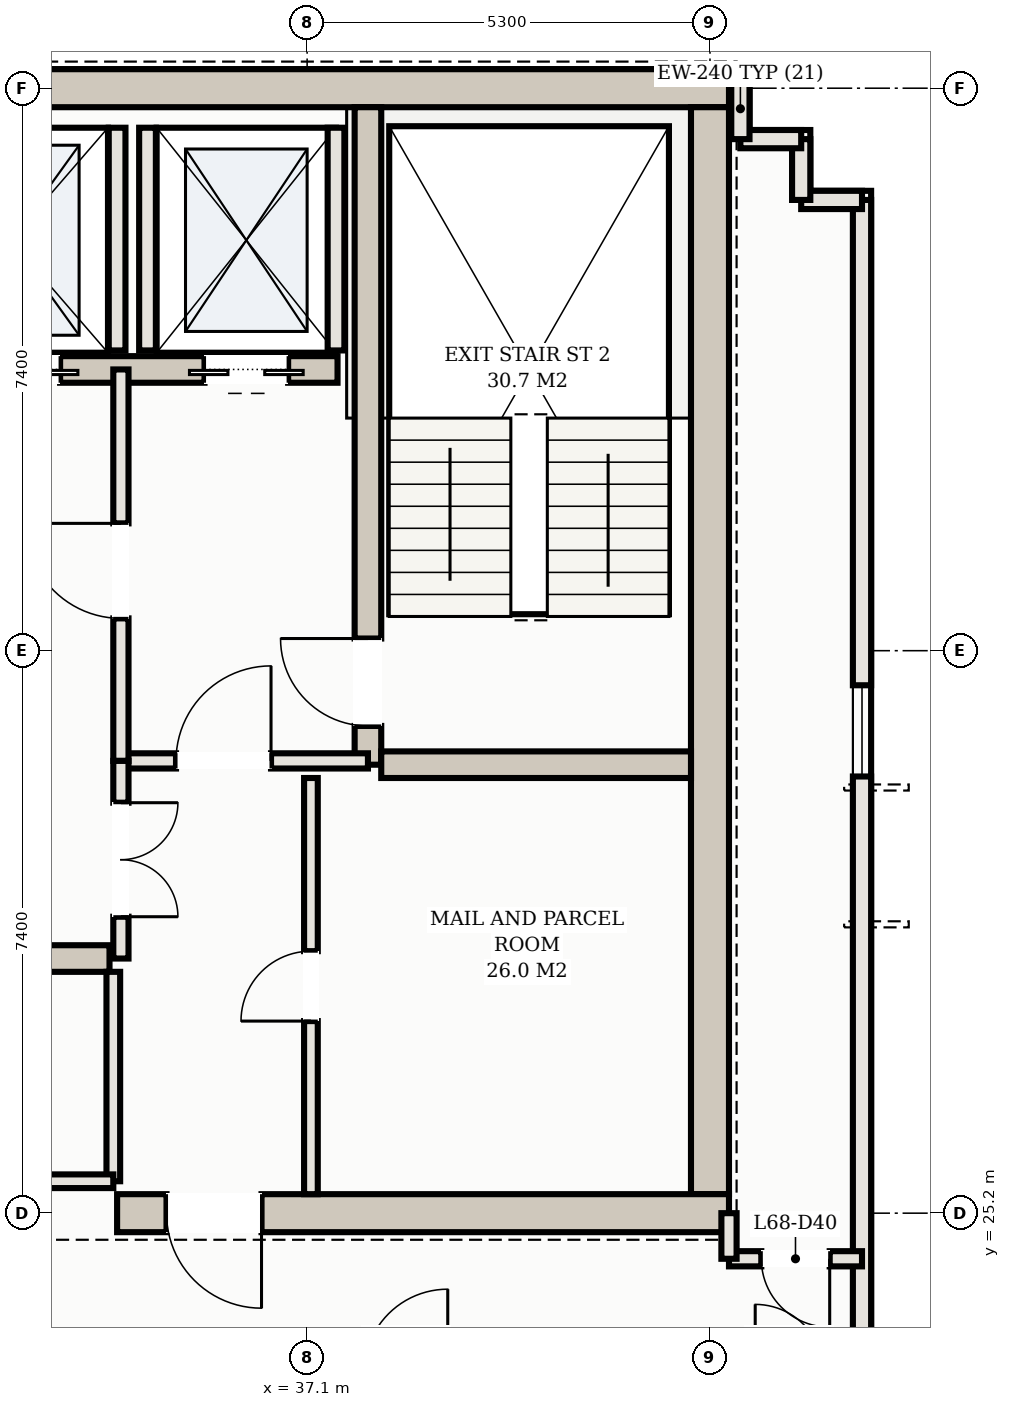
"""IFC4 building model, lengths in metres.
Left out: names, types, materials, properties, quantities, classifications, styles, units other than length and angle.
Written with IfcOpenShell. Run it as: python <this file> out.ifc"""

import sys

from ifc_helpers import new_model, si_unit, direction, frame, frame_2d, origin, place, context, subcontext, project, spatial, rectangle, extrude, element, fill, save


model = new_model("IFC4")
c1 = context("Model", 3, precision=1e-05, world=origin(), true_north=direction((0.0, 1.0)))
c2 = subcontext(c1, "Body", "Model", "MODEL_VIEW")
j1 = project(units=[si_unit("LENGTHUNIT", "METRE"), si_unit("PLANEANGLEUNIT", "RADIAN")], contexts=[c1])
p1 = place(None, origin())
s1 = spatial("IfcSite", under=j1, at=p1, CompositionType="ELEMENT")
p2 = place(p1, origin())
s2 = spatial("IfcBuilding", under=s1, at=p2, CompositionType="ELEMENT")
p3 = place(p2, frame((0.0, 0.0, 246.2)))
s3 = spatial("IfcBuildingStorey", under=s2, at=p3, CompositionType="ELEMENT", Elevation=246.2)
p4 = place(p3, frame((10.35, 40.0, 0.0), z_axis=(0.0, 0.0, 1.0), x_axis=(1.0, 0.0, 0.0)))
e1 = element("IfcWall", 1, at=p4, inside=s3, PredefinedType="SHEAR", context=c2, shape_type="SweptSolid", body=[
    extrude(rectangle(XDim=32.3, YDim=0.5, at=frame_2d((16.15, 0.0))), origin(), (0.0, 0.0, 1.0), 3.11),
])
p5 = place(p3, frame((42.4, 25.45, 0.0), z_axis=(0.0, 0.0, 1.0), x_axis=(0.0, 1.0, 0.0)))
e2 = element("IfcWall", 2, at=p5, inside=s3, PredefinedType="SHEAR", context=c2, shape_type="SweptSolid", body=[
    extrude(rectangle(XDim=14.3, YDim=0.5, at=frame_2d((7.15, 0.0))), origin(), (0.0, 0.0, 1.0), 3.11),
])
p6 = place(p3, frame((34.6, 25.2, 0.0), z_axis=(0.0, 0.0, 1.0), x_axis=(1.0, 0.0, 0.0)))
e3 = element("IfcWall", 3, at=p6, inside=s3, PredefinedType="SHEAR", context=c2, shape_type="SweptSolid", body=[
    extrude(rectangle(XDim=8.05, YDim=0.5, at=frame_2d((4.025, 0.0))), origin(), (0.0, 0.0, 1.0), 3.11),
])
p7 = place(p6, frame((0.65, 0.0, 0.0)))
e4 = element("IfcOpeningElement", 4, at=p7, cuts=e3, PredefinedType="OPENING", context=c2, shape_type="SweptSolid", body=[
    extrude(rectangle(XDim=1.25, YDim=2.2, at=frame_2d((0.625, 1.1))), frame((0.0, 0.26, 0.0), z_axis=(0.0, -1.0, 0.0), x_axis=(1.0, 0.0, 0.0)), (0.0, 0.0, 1.0), 0.52),
])
p8 = place(p3, frame((37.9, 31.1, 0.0), z_axis=(0.0, 0.0, 1.0), x_axis=(0.0, 1.0, 0.0)))
e5 = element("IfcWall", 5, at=p8, inside=s3, PredefinedType="SHEAR", context=c2, shape_type="SweptSolid", body=[
    extrude(rectangle(XDim=8.65, YDim=0.35, at=frame_2d((4.325, 0.0))), origin(), (0.0, 0.0, 1.0), 3.11),
])
p9 = place(p8, frame((0.51, 0.0, 0.0)))
e6 = element("IfcOpeningElement", 6, at=p9, cuts=e5, PredefinedType="OPENING", context=c2, shape_type="SweptSolid", body=[
    extrude(rectangle(XDim=1.15, YDim=2.2, at=frame_2d((0.575, 1.1))), frame((0.0, 0.185, 0.0), z_axis=(0.0, -1.0, 0.0), x_axis=(1.0, 0.0, 0.0)), (0.0, 0.0, 1.0), 0.37),
])
p10 = place(p3, frame((38.075, 31.1, 0.0), z_axis=(0.0, 0.0, 1.0), x_axis=(1.0, 0.0, 0.0)))
e7 = element("IfcWall", 7, at=p10, inside=s3, PredefinedType="SHEAR", context=c2, shape_type="SweptSolid", body=[
    extrude(rectangle(XDim=4.075, YDim=0.35, at=frame_2d((2.038, 0.0))), origin(), (0.0, 0.0, 1.0), 3.11),
])
p11 = place(p3, frame((15.5, 36.3, 0.0), z_axis=(0.0, 0.0, 1.0), x_axis=(1.0, 0.0, 0.0)))
e8 = element("IfcWall", 8, at=p11, inside=s3, PredefinedType="SHEAR", context=c2, shape_type="SweptSolid", body=[
    extrude(rectangle(XDim=22.0, YDim=0.35, at=frame_2d((11.0, 0.0))), origin(), (0.0, 0.0, 1.0), 3.11),
])
p12 = place(p11, frame((0.65, 0.0, 0.0)))
e9 = element("IfcOpeningElement", 9, at=p12, cuts=e8, PredefinedType="OPENING", context=c2, shape_type="SweptSolid", body=[
    extrude(rectangle(XDim=1.1, YDim=2.15, at=frame_2d((0.55, 1.075))), frame((0.0, 0.185, 0.0), z_axis=(0.0, -1.0, 0.0), x_axis=(1.0, 0.0, 0.0)), (0.0, 0.0, 1.0), 0.37),
])
p13 = place(p11, frame((20.25, 0.0, 0.0)))
e10 = element("IfcOpeningElement", 10, at=p13, cuts=e8, PredefinedType="OPENING", context=c2, shape_type="SweptSolid", body=[
    extrude(rectangle(XDim=1.1, YDim=2.15, at=frame_2d((0.55, 1.075))), frame((0.0, 0.185, 0.0), z_axis=(0.0, -1.0, 0.0), x_axis=(1.0, 0.0, 0.0)), (0.0, 0.0, 1.0), 0.37),
])
p14 = place(p11, frame((17.05, 0.0, 0.0)))
e11 = element("IfcOpeningElement", 11, at=p14, cuts=e8, PredefinedType="OPENING", context=c2, shape_type="SweptSolid", body=[
    extrude(rectangle(XDim=1.3, YDim=2.2, at=frame_2d((0.65, 1.1))), frame((0.0, 0.185, 0.0), z_axis=(0.0, -1.0, 0.0), x_axis=(1.0, 0.0, 0.0)), (0.0, 0.0, 1.0), 0.37),
])
p15 = place(p11, frame((3.95, 0.0, 0.0)))
e12 = element("IfcOpeningElement", 12, at=p15, cuts=e8, PredefinedType="OPENING", context=c2, shape_type="SweptSolid", body=[
    extrude(rectangle(XDim=1.1, YDim=2.15, at=frame_2d((0.55, 1.075))), frame((0.0, 0.185, 0.0), z_axis=(0.0, -1.0, 0.0), x_axis=(1.0, 0.0, 0.0)), (0.0, 0.0, 1.0), 0.37),
])
p16 = place(p11, frame((6.55, 0.0, 0.0)))
e13 = element("IfcOpeningElement", 13, at=p16, cuts=e8, PredefinedType="OPENING", context=c2, shape_type="SweptSolid", body=[
    extrude(rectangle(XDim=1.1, YDim=2.15, at=frame_2d((0.55, 1.075))), frame((0.0, 0.185, 0.0), z_axis=(0.0, -1.0, 0.0), x_axis=(1.0, 0.0, 0.0)), (0.0, 0.0, 1.0), 0.37),
])
p17 = place(p11, frame((9.15, 0.0, 0.0)))
e14 = element("IfcOpeningElement", 14, at=p17, cuts=e8, PredefinedType="OPENING", context=c2, shape_type="SweptSolid", body=[
    extrude(rectangle(XDim=1.1, YDim=2.15, at=frame_2d((0.55, 1.075))), frame((0.0, 0.185, 0.0), z_axis=(0.0, -1.0, 0.0), x_axis=(1.0, 0.0, 0.0)), (0.0, 0.0, 1.0), 0.37),
])
p18 = place(p3, frame((18.5, 28.55, 0.0), z_axis=(0.0, 0.0, 1.0), x_axis=(1.0, 0.0, 0.0)))
e15 = element("IfcWall", 15, at=p18, inside=s3, PredefinedType="SHEAR", context=c2, shape_type="SweptSolid", body=[
    extrude(rectangle(XDim=16.0, YDim=0.35, at=frame_2d((8.0, 0.0))), origin(), (0.0, 0.0, 1.0), 3.11),
])
for number, where, z_axis, x_axis in (
    (16, (35.0, 36.55, 0.0), (0.0, 0.0, 1.0), (0.0, 1.0, 0.0)),
    (17, (37.48, 36.55, 0.0), (0.0, 0.0, 1.0), (0.0, 1.0, 0.0)),
    (18, (34.6, 36.55, 0.0), (0.0, 0.0, 1.0), (0.0, 1.0, 0.0)),
):
    element("IfcWall", number, at=place(p3, frame(where, z_axis=z_axis, x_axis=x_axis)), inside=s3, PredefinedType="SOLIDWALL", context=c2, shape_type="SweptSolid", body=[
        extrude(rectangle(XDim=2.93, YDim=0.22, at=frame_2d((1.465, 0.0))), origin(), (0.0, 0.0, 1.0), 3.11),
    ])
p19 = place(p3, frame((44.4, 12.52, 0.0), z_axis=(0.0, 0.0, 1.0), x_axis=(0.0, 1.0, 0.0)))
e19 = element("IfcWall", 19, at=p19, inside=s3, PredefinedType="SOLIDWALL", context=c2, shape_type="SweptSolid", body=[
    extrude(rectangle(XDim=26.01, YDim=0.24, at=frame_2d((13.005, 0.0))), origin(), (0.0, 0.0, 1.0), 3.11),
])
p20 = place(p19, frame((4.48, 0.0, 0.0)))
e20 = element("IfcOpeningElement", 20, at=p20, cuts=e19, PredefinedType="OPENING", context=c2, shape_type="SweptSolid", body=[
    extrude(rectangle(XDim=1.8, YDim=2.2, at=frame_2d((0.9, 1.1))), frame((0.0, 0.13, 0.0), z_axis=(0.0, -1.0, 0.0), x_axis=(1.0, 0.0, 0.0)), (0.0, 0.0, 1.0), 0.26),
])
p21 = place(p19, frame((0.426, 0.0, 0.75)))
e21 = element("IfcOpeningElement", 21, at=p21, cuts=e19, PredefinedType="OPENING", context=c2, shape_type="SweptSolid", body=[
    extrude(rectangle(XDim=1.5, YDim=1.6, at=frame_2d((0.75, 0.8))), frame((0.0, 0.13, 0.0), z_axis=(0.0, -1.0, 0.0), x_axis=(1.0, 0.0, 0.0)), (0.0, 0.0, 1.0), 0.26),
])
p22 = place(p19, frame((2.784, 0.0, 0.75)))
e22 = element("IfcOpeningElement", 22, at=p22, cuts=e19, PredefinedType="OPENING", context=c2, shape_type="SweptSolid", body=[
    extrude(rectangle(XDim=1.2, YDim=1.5, at=frame_2d((0.6, 0.75))), frame((0.0, 0.13, 0.0), z_axis=(0.0, -1.0, 0.0), x_axis=(1.0, 0.0, 0.0)), (0.0, 0.0, 1.0), 0.26),
])
p23 = place(p19, frame((7.81, 0.0, 0.75)))
e23 = element("IfcOpeningElement", 23, at=p23, cuts=e19, PredefinedType="OPENING", context=c2, shape_type="SweptSolid", body=[
    extrude(rectangle(XDim=1.2, YDim=1.5, at=frame_2d((0.6, 0.75))), frame((0.0, 0.13, 0.0), z_axis=(0.0, -1.0, 0.0), x_axis=(1.0, 0.0, 0.0)), (0.0, 0.0, 1.0), 0.26),
])
p24 = place(p19, frame((18.425, 0.0, 0.75)))
e24 = element("IfcOpeningElement", 24, at=p24, cuts=e19, PredefinedType="OPENING", context=c2, shape_type="SweptSolid", body=[
    extrude(rectangle(XDim=1.2, YDim=1.5, at=frame_2d((0.6, 0.75))), frame((0.0, 0.13, 0.0), z_axis=(0.0, -1.0, 0.0), x_axis=(1.0, 0.0, 0.0)), (0.0, 0.0, 1.0), 0.26),
])
p25 = place(p3, frame((44.4, 38.53, 0.0), z_axis=(0.0, 0.0, 1.0), x_axis=(-1.0, 0.0, 0.0)))
e25 = element("IfcWall", 25, at=p25, inside=s3, PredefinedType="SOLIDWALL", context=c2, shape_type="SweptSolid", body=[
    extrude(rectangle(XDim=0.8, YDim=0.24, at=frame_2d((0.4, 0.0))), origin(), (0.0, 0.0, 1.0), 3.11),
])
for number, where, z_axis, x_axis in (
    (26, (43.6, 38.53, 0.0), (0.0, 0.0, 1.0), (0.0, 1.0, 0.0)),
    (27, (43.6, 39.33, 0.0), (0.0, 0.0, 1.0), (-1.0, 0.0, 0.0)),
):
    element("IfcWall", number, at=place(p3, frame(where, z_axis=z_axis, x_axis=x_axis)), inside=s3, PredefinedType="SOLIDWALL", context=c2, shape_type="SweptSolid", body=[
        extrude(rectangle(XDim=0.8, YDim=0.24, at=frame_2d((0.4, 0.0))), origin(), (0.0, 0.0, 1.0), 3.11),
    ])
p26 = place(p3, frame((42.8, 39.33, 0.0), z_axis=(0.0, 0.0, 1.0), x_axis=(0.0, 1.0, 0.0)))
e28 = element("IfcWall", 28, at=p26, inside=s3, PredefinedType="SOLIDWALL", context=c2, shape_type="SweptSolid", body=[
    extrude(rectangle(XDim=0.8, YDim=0.24, at=frame_2d((0.4, 0.0))), origin(), (0.0, 0.0, 1.0), 3.11),
])
p27 = place(p3, frame((34.65, 31.15, 0.0), z_axis=(0.0, 0.0, 1.0), x_axis=(1.0, 0.0, 0.0)))
e29 = element("IfcWall", 29, at=p27, inside=s3, PredefinedType="PARTITIONING", context=c2, shape_type="SweptSolid", body=[
    extrude(rectangle(XDim=3.25, YDim=0.2, at=frame_2d((1.625, 0.0))), origin(), (0.0, 0.0, 1.0), 2.45),
])
p28 = place(p27, frame((0.725, 0.0, 0.0)))
e30 = element("IfcOpeningElement", 30, at=p28, cuts=e29, PredefinedType="OPENING", context=c2, shape_type="SweptSolid", body=[
    extrude(rectangle(XDim=1.25, YDim=2.2, at=frame_2d((0.625, 1.1))), frame((0.0, 0.11, 0.0), z_axis=(0.0, -1.0, 0.0), x_axis=(1.0, 0.0, 0.0)), (0.0, 0.0, 1.0), 0.22),
])
p29 = place(p3, frame((34.65, 31.15, 0.0), z_axis=(0.0, 0.0, 1.0), x_axis=(0.0, 1.0, 0.0)))
e31 = element("IfcWall", 31, at=p29, inside=s3, PredefinedType="PARTITIONING", context=c2, shape_type="SweptSolid", body=[
    extrude(rectangle(XDim=5.15, YDim=0.2, at=frame_2d((2.575, 0.0))), origin(), (0.0, 0.0, 1.0), 2.45),
])
p30 = place(p29, frame((1.875, 0.0, 0.0)))
e32 = element("IfcOpeningElement", 32, at=p30, cuts=e31, PredefinedType="OPENING", context=c2, shape_type="SweptSolid", body=[
    extrude(rectangle(XDim=1.25, YDim=2.2, at=frame_2d((0.625, 1.1))), frame((0.0, 0.11, 0.0), z_axis=(0.0, -1.0, 0.0), x_axis=(1.0, 0.0, 0.0)), (0.0, 0.0, 1.0), 0.22),
])
p31 = place(p3, frame((37.15, 25.45, 0.0), z_axis=(0.0, 0.0, 1.0), x_axis=(0.0, 1.0, 0.0)))
e33 = element("IfcWall", 33, at=p31, inside=s3, PredefinedType="PARTITIONING", context=c2, shape_type="SweptSolid", body=[
    extrude(rectangle(XDim=5.475, YDim=0.18, at=frame_2d((2.738, 0.0))), origin(), (0.0, 0.0, 1.0), 2.45),
])
p32 = place(p31, frame((2.277, 0.0, 0.0)))
e34 = element("IfcOpeningElement", 34, at=p32, cuts=e33, PredefinedType="OPENING", context=c2, shape_type="SweptSolid", body=[
    extrude(rectangle(XDim=0.92, YDim=2.15, at=frame_2d((0.46, 1.075))), frame((0.0, 0.1, 0.0), z_axis=(0.0, -1.0, 0.0), x_axis=(1.0, 0.0, 0.0)), (0.0, 0.0, 1.0), 0.2),
])
p33 = place(p3, frame((34.65, 28.55, 0.0), z_axis=(0.0, 0.0, 1.0), x_axis=(0.0, 1.0, 0.0)))
e35 = element("IfcWall", 35, at=p33, inside=s3, PredefinedType="PARTITIONING", context=c2, shape_type="SweptSolid", body=[
    extrude(rectangle(XDim=2.6, YDim=0.2, at=frame_2d((1.3, 0.0))), origin(), (0.0, 0.0, 1.0), 2.45),
])
p34 = place(p33, frame((0.55, 0.0, 0.0)))
e36 = element("IfcOpeningElement", 36, at=p34, cuts=e35, PredefinedType="OPENING", context=c2, shape_type="SweptSolid", body=[
    extrude(rectangle(XDim=1.5, YDim=2.25, at=frame_2d((0.75, 1.125))), frame((0.0, 0.11, 0.0), z_axis=(0.0, -1.0, 0.0), x_axis=(1.0, 0.0, 0.0)), (0.0, 0.0, 1.0), 0.22),
])
p35 = place(p3, frame((34.55, 25.62, 0.0), z_axis=(0.0, 0.0, 1.0), x_axis=(0.0, 1.0, 0.0)))
e37 = element("IfcWall", 37, at=p35, inside=s3, PredefinedType="PARTITIONING", context=c2, shape_type="SweptSolid", body=[
    extrude(rectangle(XDim=2.755, YDim=0.18, at=frame_2d((1.377, 0.0))), origin(), (0.0, 0.0, 1.0), 2.45),
])
p36 = place(p3, frame((26.65, 25.62, 0.0), z_axis=(0.0, 0.0, 1.0), x_axis=(1.0, 0.0, 0.0)))
e38 = element("IfcWall", 38, at=p36, inside=s3, PredefinedType="PARTITIONING", context=c2, shape_type="SweptSolid", body=[
    extrude(rectangle(XDim=7.9, YDim=0.18, at=frame_2d((3.95, 0.0))), origin(), (0.0, 0.0, 1.0), 2.45),
])
p37 = place(p36, frame((3.34, 0.0, 0.0)))
e39 = element("IfcOpeningElement", 39, at=p37, cuts=e38, PredefinedType="OPENING", context=c2, shape_type="SweptSolid", body=[
    extrude(rectangle(XDim=0.92, YDim=2.15, at=frame_2d((0.46, 1.075))), frame((0.0, 0.1, 0.0), z_axis=(0.0, -1.0, 0.0), x_axis=(1.0, 0.0, 0.0)), (0.0, 0.0, 1.0), 0.2),
])
p38 = place(p3, frame((42.65, 24.6, 0.0), z_axis=(0.0, 0.0, 1.0), x_axis=(1.0, 0.0, 0.0)))
e40 = element("IfcWall", 40, at=p38, inside=s3, PredefinedType="PARTITIONING", context=c2, shape_type="SweptSolid", body=[
    extrude(rectangle(XDim=1.75, YDim=0.2, at=frame_2d((0.875, 0.0))), origin(), (0.0, 0.0, 1.0), 2.45),
])
p39 = place(p38, frame((0.425, 0.0, 0.0)))
e41 = element("IfcOpeningElement", 41, at=p39, cuts=e40, PredefinedType="OPENING", context=c2, shape_type="SweptSolid", body=[
    extrude(rectangle(XDim=0.9, YDim=2.15, at=frame_2d((0.45, 1.075))), frame((0.0, 0.11, 0.0), z_axis=(0.0, -1.0, 0.0), x_axis=(1.0, 0.0, 0.0)), (0.0, 0.0, 1.0), 0.22),
])
p40 = place(p3, frame((42.65, 24.6, 0.0), z_axis=(0.0, 0.0, 1.0), x_axis=(0.0, 1.0, 0.0)))
e42 = element("IfcWall", 42, at=p40, inside=s3, PredefinedType="PARTITIONING", context=c2, shape_type="SweptSolid", body=[
    extrude(rectangle(XDim=0.6, YDim=0.2, at=frame_2d((0.3, 0.0))), origin(), (0.0, 0.0, 1.0), 2.45),
])
p41 = place(p13, frame((1.1, 0.0, 0.0), z_axis=(0.0, 0.0, 1.0), x_axis=(-1.0, 0.0, 0.0)))
e43 = element("IfcDoor", 43, at=p41, inside=s3, OperationType="DOUBLE_DOOR_SLIDING", PredefinedType="DOOR", context=c2, shape_type="SweptSolid", body=[
    extrude(rectangle(XDim=1.1, YDim=2.15, at=frame_2d((0.55, 1.075))), frame((0.0, 0.025, 0.0), z_axis=(0.0, -1.0, 0.0), x_axis=(1.0, 0.0, 0.0)), (0.0, 0.0, 1.0), 0.05),
])
fill(e10, e43)
p42 = place(p14, frame((1.3, 0.0, 0.0), z_axis=(0.0, 0.0, 1.0), x_axis=(-1.0, 0.0, 0.0)))
e44 = element("IfcDoor", 44, at=p42, inside=s3, OperationType="DOUBLE_DOOR_SLIDING", PredefinedType="DOOR", context=c2, shape_type="SweptSolid", body=[
    extrude(rectangle(XDim=1.3, YDim=2.2, at=frame_2d((0.65, 1.1))), frame((0.0, 0.025, 0.0), z_axis=(0.0, -1.0, 0.0), x_axis=(1.0, 0.0, 0.0)), (0.0, 0.0, 1.0), 0.05),
])
fill(e11, e44)
p43 = place(p7, frame((1.25, 0.0, 0.0), z_axis=(0.0, 0.0, 1.0), x_axis=(-1.0, 0.0, 0.0)))
e45 = element("IfcDoor", 45, at=p43, inside=s3, OperationType="SINGLE_SWING_LEFT", PredefinedType="DOOR", context=c2, shape_type="SweptSolid", body=[
    extrude(rectangle(XDim=1.25, YDim=2.2, at=frame_2d((0.625, 1.1))), frame((0.0, 0.025, 0.0), z_axis=(0.0, -1.0, 0.0), x_axis=(1.0, 0.0, 0.0)), (0.0, 0.0, 1.0), 0.05),
])
fill(e4, e45)
p44 = place(p28, origin())
e46 = element("IfcDoor", 46, at=p44, inside=s3, OperationType="SINGLE_SWING_RIGHT", PredefinedType="DOOR", context=c2, shape_type="SweptSolid", body=[
    extrude(rectangle(XDim=1.25, YDim=2.2, at=frame_2d((0.625, 1.1))), frame((0.0, 0.025, 0.0), z_axis=(0.0, -1.0, 0.0), x_axis=(1.0, 0.0, 0.0)), (0.0, 0.0, 1.0), 0.05),
])
fill(e30, e46)
p45 = place(p30, origin())
e47 = element("IfcDoor", 47, at=p45, inside=s3, OperationType="SINGLE_SWING_RIGHT", PredefinedType="DOOR", context=c2, shape_type="SweptSolid", body=[
    extrude(rectangle(XDim=1.25, YDim=2.2, at=frame_2d((0.625, 1.1))), frame((0.0, 0.025, 0.0), z_axis=(0.0, -1.0, 0.0), x_axis=(1.0, 0.0, 0.0)), (0.0, 0.0, 1.0), 0.05),
])
fill(e32, e47)
p46 = place(p9, origin())
e48 = element("IfcDoor", 48, at=p46, inside=s3, OperationType="SINGLE_SWING_RIGHT", PredefinedType="DOOR", context=c2, shape_type="SweptSolid", body=[
    extrude(rectangle(XDim=1.15, YDim=2.2, at=frame_2d((0.575, 1.1))), frame((0.0, 0.025, 0.0), z_axis=(0.0, -1.0, 0.0), x_axis=(1.0, 0.0, 0.0)), (0.0, 0.0, 1.0), 0.05),
])
fill(e6, e48)
p47 = place(p32, origin())
e49 = element("IfcDoor", 49, at=p47, inside=s3, OperationType="SINGLE_SWING_LEFT", PredefinedType="DOOR", context=c2, shape_type="SweptSolid", body=[
    extrude(rectangle(XDim=0.92, YDim=2.15, at=frame_2d((0.46, 1.075))), frame((0.0, 0.025, 0.0), z_axis=(0.0, -1.0, 0.0), x_axis=(1.0, 0.0, 0.0)), (0.0, 0.0, 1.0), 0.05),
])
fill(e34, e49)
p48 = place(p34, frame((1.5, 0.0, 0.0), z_axis=(0.0, 0.0, 1.0), x_axis=(-1.0, 0.0, 0.0)))
e50 = element("IfcDoor", 50, at=p48, inside=s3, OperationType="DOUBLE_DOOR_SINGLE_SWING", PredefinedType="DOOR", context=c2, shape_type="SweptSolid", body=[
    extrude(rectangle(XDim=1.5, YDim=2.25, at=frame_2d((0.75, 1.125))), frame((0.0, 0.025, 0.0), z_axis=(0.0, -1.0, 0.0), x_axis=(1.0, 0.0, 0.0)), (0.0, 0.0, 1.0), 0.05),
])
fill(e36, e50)
p49 = place(p39, frame((0.9, 0.0, 0.0), z_axis=(0.0, 0.0, 1.0), x_axis=(-1.0, 0.0, 0.0)))
e51 = element("IfcDoor", 51, at=p49, inside=s3, OperationType="SINGLE_SWING_LEFT", PredefinedType="DOOR", context=c2, shape_type="SweptSolid", body=[
    extrude(rectangle(XDim=0.9, YDim=2.15, at=frame_2d((0.45, 1.075))), frame((0.0, 0.025, 0.0), z_axis=(0.0, -1.0, 0.0), x_axis=(1.0, 0.0, 0.0)), (0.0, 0.0, 1.0), 0.05),
])
fill(e41, e51)
p50 = place(p24, origin())
e52 = element("IfcWindow", 52, at=p50, inside=s3, PartitioningType="SINGLE_PANEL", PredefinedType="WINDOW", context=c2, shape_type="SweptSolid", body=[
    extrude(rectangle(XDim=1.2, YDim=1.5, at=frame_2d((0.6, 0.75))), frame((0.0, 0.03, 0.0), z_axis=(0.0, -1.0, 0.0), x_axis=(1.0, 0.0, 0.0)), (0.0, 0.0, 1.0), 0.06),
])
fill(e24, e52)
save(model, sys.argv[1])
